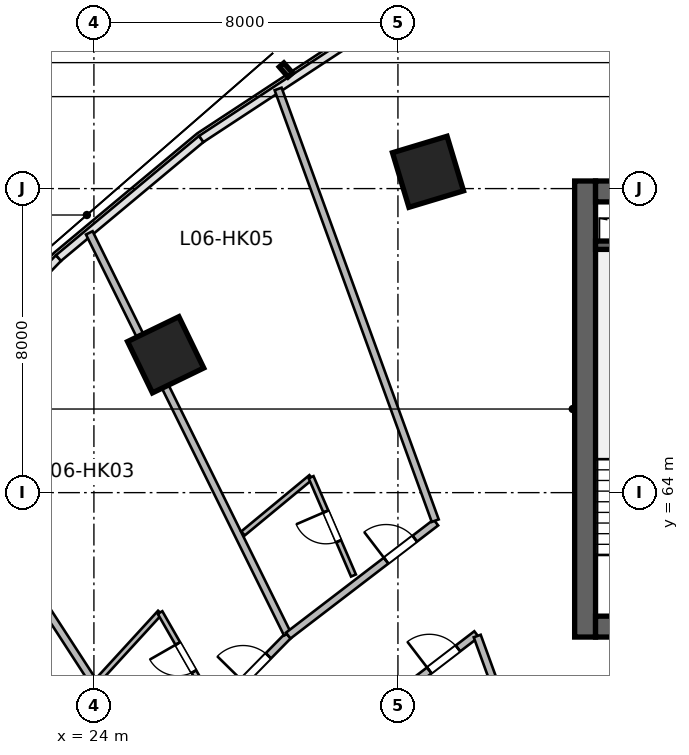
"""IFC4 building model, lengths in metres.
Left out: names, types, materials, properties, quantities, classifications, styles, units other than length and angle.
Written with IfcOpenShell. Run it as: python <this file> out.ifc"""

import sys

from ifc_helpers import new_model, si_unit, direction, frame, frame_2d, origin, origin_2d, place, context, subcontext, project, spatial, rectangle, extrude, source, transform, mapped, element, fill, save


model = new_model("IFC4")
c1 = context("Model", 3, precision=1e-05, world=origin(), true_north=direction((0.0, 1.0)))
c2 = subcontext(c1, "Body", "Model", "MODEL_VIEW")
j1 = project(units=[si_unit("LENGTHUNIT", "METRE"), si_unit("PLANEANGLEUNIT", "RADIAN")], contexts=[c1])
p1 = place(None, origin())
s1 = spatial("IfcSite", under=j1, at=p1, CompositionType="ELEMENT")
p2 = place(p1, origin())
s2 = spatial("IfcBuilding", under=s1, at=p2, CompositionType="ELEMENT")
p3 = place(p2, frame((0.0, 0.0, 35.4)))
s3 = spatial("IfcBuildingStorey", under=s2, at=p3, CompositionType="ELEMENT", Elevation=35.4)
m1 = source(origin(), c2, "Body", "SweptSolid", [
    extrude(rectangle(XDim=12.0, YDim=0.55, at=frame_2d((6.0, 0.0))), origin(), (0.0, 0.0, 1.0), 3.6),
])
p4 = place(p3, frame((36.925, 60.2, 0.0), z_axis=(0.0, 0.0, 1.0), x_axis=(0.0, 1.0, 0.0)))
e1 = element("IfcWall", 1, at=p4, inside=s3, PredefinedType="SHEAR", context=c2, shape_type="MappedRepresentation", body=[
    mapped(m1, transform((0.0, 0.0, 0.0), scale=1.0)),
])
m2 = source(origin(), c2, "Body", "SweptSolid", [
    extrude(rectangle(XDim=21.6, YDim=0.55, at=frame_2d((10.8, 0.0))), origin(), (0.0, 0.0, 1.0), 3.6),
])
p5 = place(p3, frame((37.2, 60.475, 0.0), z_axis=(0.0, 0.0, 1.0), x_axis=(1.0, 0.0, 0.0)))
e2 = element("IfcWall", 2, at=p5, inside=s3, PredefinedType="SHEAR", context=c2, shape_type="MappedRepresentation", body=[
    mapped(m2, transform((0.0, 0.0, 0.0), scale=1.0)),
])
p6 = place(p5, frame((1.1, 0.0, 0.0)))
e3 = element("IfcOpeningElement", 3, at=p6, cuts=e2, PredefinedType="OPENING", context=c2, shape_type="SweptSolid", body=[
    extrude(rectangle(XDim=1.15, YDim=2.15, at=frame_2d((0.575, 1.075))), frame((0.0, 0.285, 0.0), z_axis=(0.0, -1.0, 0.0), x_axis=(1.0, 0.0, 0.0)), (0.0, 0.0, 1.0), 0.57),
])
p7 = place(p5, frame((19.5, 0.0, 0.0)))
e4 = element("IfcOpeningElement", 4, at=p7, cuts=e2, PredefinedType="OPENING", context=c2, shape_type="SweptSolid", body=[
    extrude(rectangle(XDim=0.9, YDim=2.1, at=frame_2d((0.45, 1.05))), frame((0.0, 0.285, 0.0), z_axis=(0.0, -1.0, 0.0), x_axis=(1.0, 0.0, 0.0)), (0.0, 0.0, 1.0), 0.57),
])
p8 = place(p5, frame((12.02, 0.0, 0.0)))
e5 = element("IfcOpeningElement", 5, at=p8, cuts=e2, PredefinedType="OPENING", context=c2, shape_type="SweptSolid", body=[
    extrude(rectangle(XDim=1.6, YDim=2.15, at=frame_2d((0.8, 1.075))), frame((0.0, 0.285, 0.0), z_axis=(0.0, -1.0, 0.0), x_axis=(1.0, 0.0, 0.0)), (0.0, 0.0, 1.0), 0.57),
])
p9 = place(p3, frame((37.2, 71.925, 0.0), z_axis=(0.0, 0.0, 1.0), x_axis=(1.0, 0.0, 0.0)))
e6 = element("IfcWall", 6, at=p9, inside=s3, PredefinedType="SHEAR", context=c2, shape_type="MappedRepresentation", body=[
    mapped(m2, transform((0.0, 0.0, 0.0), scale=1.0)),
])
p10 = place(p9, frame((1.2, 0.0, 0.0)))
e7 = element("IfcOpeningElement", 7, at=p10, cuts=e6, PredefinedType="OPENING", context=c2, shape_type="SweptSolid", body=[
    extrude(rectangle(XDim=0.9, YDim=2.1, at=frame_2d((0.45, 1.05))), frame((0.0, 0.285, 0.0), z_axis=(0.0, -1.0, 0.0), x_axis=(1.0, 0.0, 0.0)), (0.0, 0.0, 1.0), 0.57),
])
p11 = place(p9, frame((14.7, 0.0, 0.0)))
e8 = element("IfcOpeningElement", 8, at=p11, cuts=e6, PredefinedType="OPENING", context=c2, shape_type="SweptSolid", body=[
    extrude(rectangle(XDim=1.2, YDim=2.15, at=frame_2d((0.6, 1.075))), frame((0.0, 0.285, 0.0), z_axis=(0.0, -1.0, 0.0), x_axis=(1.0, 0.0, 0.0)), (0.0, 0.0, 1.0), 0.57),
])
p12 = place(p9, frame((4.15, 0.0, 0.0)))
e9 = element("IfcOpeningElement", 9, at=p12, cuts=e6, PredefinedType="OPENING", context=c2, shape_type="SweptSolid", body=[
    extrude(rectangle(XDim=1.3, YDim=2.15, at=frame_2d((0.65, 1.075))), frame((0.0, 0.285, 0.0), z_axis=(0.0, -1.0, 0.0), x_axis=(1.0, 0.0, 0.0)), (0.0, 0.0, 1.0), 0.57),
])
p13 = place(p9, frame((7.1, 0.0, 0.0)))
e10 = element("IfcOpeningElement", 10, at=p13, cuts=e6, PredefinedType="OPENING", context=c2, shape_type="SweptSolid", body=[
    extrude(rectangle(XDim=0.9, YDim=2.1, at=frame_2d((0.45, 1.05))), frame((0.0, 0.285, 0.0), z_axis=(0.0, -1.0, 0.0), x_axis=(1.0, 0.0, 0.0)), (0.0, 0.0, 1.0), 0.57),
])
m3 = source(origin(), c2, "Body", "SweptSolid", [
    extrude(rectangle(XDim=3.27, YDim=0.22, at=frame_2d((1.635, 0.0))), origin(), (0.0, 0.0, 1.0), 3.6),
])
p14 = place(p3, frame((37.2, 70.51, 0.0), z_axis=(0.0, 0.0, 1.0), x_axis=(1.0, 0.0, 0.0)))
e11 = element("IfcWall", 11, at=p14, inside=s3, PredefinedType="SHEAR", context=c2, shape_type="MappedRepresentation", body=[
    mapped(m3, transform((0.0, 0.0, 0.0), scale=1.0)),
])
m4 = source(origin(), c2, "Body", "SweptSolid", [
    extrude(rectangle(XDim=1.5, YDim=1.5, at=origin_2d()), origin(), (0.0, 0.0, 1.0), 3.6),
])
for number, where, z_axis, x_axis in (
    (12, (25.888, 67.627, 0.0), (0.0, 0.0, 1.0), (-0.436, 0.9, 0.0)),
    (13, (32.791, 72.442, 0.0), (0.0, 0.0, 1.0), (-0.289, 0.957, 0.0)),
):
    element("IfcColumn", number, at=place(p3, frame(where, z_axis=z_axis, x_axis=x_axis)), inside=s3, PredefinedType="COLUMN", context=c2, shape_type="MappedRepresentation", body=[
        mapped(m4, transform((0.0, 0.0, 0.0), scale=1.0)),
    ])
m5 = source(origin(), c2, "Body", "SweptSolid", [
    extrude(rectangle(XDim=11.403, YDim=0.195, at=frame_2d((5.701, 0.0))), origin(), (0.0, 0.0, 1.0), 3.36),
])
p15 = place(p3, frame((25.523, 56.647, 0.0), z_axis=(0.0, 0.0, 1.0), x_axis=(-0.544246090008, 0.838925618581, 0.0)))
e14 = element("IfcWall", 14, at=p15, inside=s3, PredefinedType="PARTITIONING", context=c2, shape_type="MappedRepresentation", body=[
    mapped(m5, transform((0.0, 0.0, 0.0), scale=1.0)),
])
m6 = source(origin(), c2, "Body", "SweptSolid", [
    extrude(rectangle(XDim=5.087, YDim=0.195, at=frame_2d((2.543, 0.0))), origin(), (0.0, 0.0, 1.0), 3.36),
])
p16 = place(p3, frame((25.55, 56.607, 0.0), z_axis=(0.0, 0.0, 1.0), x_axis=(0.700428330775, 0.7137227427, 0.0)))
e15 = element("IfcWall", 15, at=p16, inside=s3, PredefinedType="PARTITIONING", context=c2, shape_type="MappedRepresentation", body=[
    mapped(m6, transform((0.0, 0.0, 0.0), scale=1.0)),
])
p17 = place(p16, frame((3.391, 0.0, 0.0)))
e16 = element("IfcOpeningElement", 16, at=p17, cuts=e15, PredefinedType="OPENING", context=c2, shape_type="SweptSolid", body=[
    extrude(rectangle(XDim=0.95, YDim=2.15, at=frame_2d((0.475, 1.075))), frame((0.0, 0.107, 0.0), z_axis=(0.0, -1.0, 0.0), x_axis=(1.0, 0.0, 0.0)), (0.0, 0.0, 1.0), 0.215),
])
m7 = source(origin(), c2, "Body", "SweptSolid", [
    extrude(rectangle(XDim=11.77, YDim=0.195, at=frame_2d((5.885, 0.0))), origin(), (0.0, 0.0, 1.0), 3.36),
])
p18 = place(p3, frame((29.091, 60.282, 0.0), z_axis=(0.0, 0.0, 1.0), x_axis=(-0.44286060326, 0.896590478468, 0.0)))
e17 = element("IfcWall", 17, at=p18, inside=s3, PredefinedType="PARTITIONING", context=c2, shape_type="MappedRepresentation", body=[
    mapped(m7, transform((0.0, 0.0, 0.0), scale=1.0)),
])
m8 = source(origin(), c2, "Body", "SweptSolid", [
    extrude(rectangle(XDim=2.416, YDim=0.14, at=frame_2d((1.208, 0.0))), origin(), (0.0, 0.0, 1.0), 3.36),
])
p19 = place(p3, frame((24.108, 59.064, 0.0), z_axis=(0.0, 0.0, 1.0), x_axis=(0.675399637907, 0.737451916476, 0.0)))
e18 = element("IfcWall", 18, at=p19, inside=s3, PredefinedType="PARTITIONING", context=c2, shape_type="MappedRepresentation", body=[
    mapped(m8, transform((0.0, 0.0, 0.0), scale=1.0)),
])
m9 = source(origin(), c2, "Body", "SweptSolid", [
    extrude(rectangle(XDim=2.732, YDim=0.14, at=frame_2d((1.366, 0.0))), origin(), (0.0, 0.0, 1.0), 3.36),
])
p20 = place(p3, frame((27.098, 58.476, 0.0), z_axis=(0.0, 0.0, 1.0), x_axis=(-0.497254966372, 0.867604459658, 0.0)))
e19 = element("IfcWall", 19, at=p20, inside=s3, PredefinedType="PARTITIONING", context=c2, shape_type="MappedRepresentation", body=[
    mapped(m9, transform((0.0, 0.0, 0.0), scale=1.0)),
])
p21 = place(p20, frame((0.941, 0.0, 0.0)))
e20 = element("IfcOpeningElement", 20, at=p21, cuts=e19, PredefinedType="OPENING", context=c2, shape_type="SweptSolid", body=[
    extrude(rectangle(XDim=0.85, YDim=2.05, at=frame_2d((0.425, 1.025))), frame((0.0, 0.08, 0.0), z_axis=(0.0, -1.0, 0.0), x_axis=(1.0, 0.0, 0.0)), (0.0, 0.0, 1.0), 0.16),
])
m10 = source(origin(), c2, "Body", "SweptSolid", [
    extrude(rectangle(XDim=4.895, YDim=0.195, at=frame_2d((2.447, 0.0))), origin(), (0.0, 0.0, 1.0), 3.36),
])
p22 = place(p3, frame((29.113, 60.238, 0.0), z_axis=(0.0, 0.0, 1.0), x_axis=(0.793896075849, 0.608053468661, 0.0)))
e21 = element("IfcWall", 21, at=p22, inside=s3, PredefinedType="PARTITIONING", context=c2, shape_type="MappedRepresentation", body=[
    mapped(m10, transform((0.0, 0.0, 0.0), scale=1.0)),
])
p23 = place(p22, frame((3.245, 0.0, 0.0)))
e22 = element("IfcOpeningElement", 22, at=p23, cuts=e21, PredefinedType="OPENING", context=c2, shape_type="SweptSolid", body=[
    extrude(rectangle(XDim=0.95, YDim=2.15, at=frame_2d((0.475, 1.075))), frame((0.0, 0.107, 0.0), z_axis=(0.0, -1.0, 0.0), x_axis=(1.0, 0.0, 0.0)), (0.0, 0.0, 1.0), 0.215),
])
m11 = source(origin(), c2, "Body", "SweptSolid", [
    extrude(rectangle(XDim=12.088, YDim=0.195, at=frame_2d((6.044, 0.0))), origin(), (0.0, 0.0, 1.0), 3.36),
])
p24 = place(p3, frame((32.981, 63.262, 0.0), z_axis=(0.0, 0.0, 1.0), x_axis=(-0.34203007529, 0.939689005787, 0.0)))
e23 = element("IfcWall", 23, at=p24, inside=s3, PredefinedType="PARTITIONING", context=c2, shape_type="MappedRepresentation", body=[
    mapped(m11, transform((0.0, 0.0, 0.0), scale=1.0)),
])
m12 = source(origin(), c2, "Body", "SweptSolid", [
    extrude(rectangle(XDim=2.324, YDim=0.14, at=frame_2d((1.162, 0.0))), origin(), (0.0, 0.0, 1.0), 3.36),
])
p25 = place(p3, frame((27.923, 62.926, 0.0), z_axis=(0.0, 0.0, 1.0), x_axis=(0.770746444956, 0.637141991701, 0.0)))
e24 = element("IfcWall", 24, at=p25, inside=s3, PredefinedType="PARTITIONING", context=c2, shape_type="MappedRepresentation", body=[
    mapped(m12, transform((0.0, 0.0, 0.0), scale=1.0)),
])
m13 = source(origin(), c2, "Body", "SweptSolid", [
    extrude(rectangle(XDim=2.818, YDim=0.14, at=frame_2d((1.409, 0.0))), origin(), (0.0, 0.0, 1.0), 3.36),
])
p26 = place(p3, frame((30.83, 61.819, 0.0), z_axis=(0.0, 0.0, 1.0), x_axis=(-0.395894859341, 0.918295845764, 0.0)))
e25 = element("IfcWall", 25, at=p26, inside=s3, PredefinedType="PARTITIONING", context=c2, shape_type="MappedRepresentation", body=[
    mapped(m13, transform((0.0, 0.0, 0.0), scale=1.0)),
])
p27 = place(p26, frame((0.984, 0.0, 0.0)))
e26 = element("IfcOpeningElement", 26, at=p27, cuts=e25, PredefinedType="OPENING", context=c2, shape_type="SweptSolid", body=[
    extrude(rectangle(XDim=0.85, YDim=2.05, at=frame_2d((0.425, 1.025))), frame((0.0, 0.08, 0.0), z_axis=(0.0, -1.0, 0.0), x_axis=(1.0, 0.0, 0.0)), (0.0, 0.0, 1.0), 0.16),
])
m14 = source(origin(), c2, "Body", "SweptSolid", [
    extrude(rectangle(XDim=4.546, YDim=0.195, at=frame_2d((2.273, 0.0))), origin(), (0.0, 0.0, 1.0), 3.36),
])
p28 = place(p3, frame((30.459, 57.511, 0.0), z_axis=(0.0, 0.0, 1.0), x_axis=(0.793907931297, 0.608037989457, 0.0)))
e27 = element("IfcWall", 27, at=p28, inside=s3, PredefinedType="PARTITIONING", context=c2, shape_type="MappedRepresentation", body=[
    mapped(m14, transform((0.0, 0.0, 0.0), scale=1.0)),
])
p29 = place(p28, frame((2.98, 0.0, 0.0)))
e28 = element("IfcOpeningElement", 28, at=p29, cuts=e27, PredefinedType="OPENING", context=c2, shape_type="SweptSolid", body=[
    extrude(rectangle(XDim=0.95, YDim=2.15, at=frame_2d((0.475, 1.075))), frame((0.0, 0.107, 0.0), z_axis=(0.0, -1.0, 0.0), x_axis=(1.0, 0.0, 0.0)), (0.0, 0.0, 1.0), 0.215),
])
m15 = source(origin(), c2, "Body", "SweptSolid", [
    extrude(rectangle(XDim=12.196, YDim=0.195, at=frame_2d((6.098, 0.0))), origin(), (0.0, 0.0, 1.0), 3.36),
])
p30 = place(p3, frame((38.258, 48.766, 0.0), z_axis=(0.0, 0.0, 1.0), x_axis=(-0.342022711534, 0.939691686031, 0.0)))
e29 = element("IfcWall", 29, at=p30, inside=s3, PredefinedType="PARTITIONING", context=c2, shape_type="MappedRepresentation", body=[
    mapped(m15, transform((0.0, 0.0, 0.0), scale=1.0)),
])
m16 = source(origin(), c2, "Body", "SweptSolid", [
    extrude(rectangle(XDim=0.95, YDim=2.15, at=frame_2d((0.475, 1.075))), frame((0.0, 0.025, 0.0), z_axis=(0.0, -1.0, 0.0), x_axis=(1.0, 0.0, 0.0)), (0.0, 0.0, 1.0), 0.05),
])
p31 = place(p17, origin())
e30 = element("IfcDoor", 30, at=p31, inside=s3, OperationType="SINGLE_SWING_LEFT", PredefinedType="DOOR", context=c2, shape_type="MappedRepresentation", body=[
    mapped(m16, transform((0.0, 0.0, 0.0), scale=1.0)),
])
fill(e16, e30)
m17 = source(origin(), c2, "Body", "SweptSolid", [
    extrude(rectangle(XDim=0.85, YDim=2.05, at=frame_2d((0.425, 1.025))), frame((0.0, 0.025, 0.0), z_axis=(0.0, -1.0, 0.0), x_axis=(1.0, 0.0, 0.0)), (0.0, 0.0, 1.0), 0.05),
])
p32 = place(p21, origin())
e31 = element("IfcDoor", 31, at=p32, inside=s3, OperationType="SINGLE_SWING_RIGHT", PredefinedType="DOOR", context=c2, shape_type="MappedRepresentation", body=[
    mapped(m17, transform((0.0, 0.0, 0.0), scale=1.0)),
])
fill(e20, e31)
p33 = place(p23, origin())
e32 = element("IfcDoor", 32, at=p33, inside=s3, OperationType="SINGLE_SWING_LEFT", PredefinedType="DOOR", context=c2, shape_type="MappedRepresentation", body=[
    mapped(m16, transform((0.0, 0.0, 0.0), scale=1.0)),
])
fill(e22, e32)
p34 = place(p27, origin())
e33 = element("IfcDoor", 33, at=p34, inside=s3, OperationType="SINGLE_SWING_RIGHT", PredefinedType="DOOR", context=c2, shape_type="MappedRepresentation", body=[
    mapped(m17, transform((0.0, 0.0, 0.0), scale=1.0)),
])
fill(e26, e33)
p35 = place(p29, origin())
e34 = element("IfcDoor", 34, at=p35, inside=s3, OperationType="SINGLE_SWING_LEFT", PredefinedType="DOOR", context=c2, shape_type="MappedRepresentation", body=[
    mapped(m16, transform((0.0, 0.0, 0.0), scale=1.0)),
])
fill(e28, e34)
save(model, sys.argv[1])
